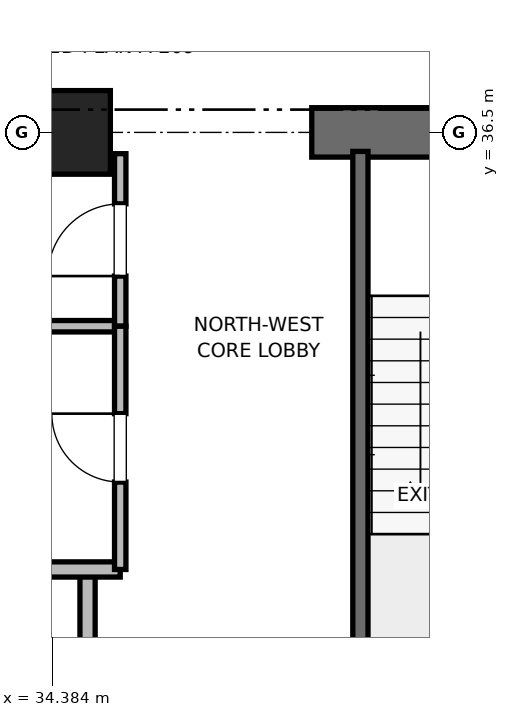
"""IFC4 building model, lengths in metres.
Left out: names, types, materials, properties, quantities, classifications, styles, units other than length and angle.
Written with IfcOpenShell. Run it as: python <this file> out.ifc"""

import sys

from ifc_helpers import new_model, si_unit, direction, frame, frame_2d, origin, origin_2d, place, context, subcontext, project, spatial, rectangle, extrude, element, fill, save


model = new_model("IFC4")
c1 = context("Model", 3, precision=1e-05, world=origin(), true_north=direction((0.0, 1.0)))
c2 = subcontext(c1, "Body", "Model", "MODEL_VIEW")
j1 = project(units=[si_unit("LENGTHUNIT", "METRE"), si_unit("PLANEANGLEUNIT", "RADIAN")], contexts=[c1])
p1 = place(None, origin())
s1 = spatial("IfcSite", under=j1, at=p1, CompositionType="ELEMENT")
p2 = place(p1, origin())
s2 = spatial("IfcBuilding", under=s1, at=p2, CompositionType="ELEMENT")
p3 = place(p2, frame((0.0, 0.0, 31.6)))
s3 = spatial("IfcBuildingStorey", under=s2, at=p3, CompositionType="ELEMENT", Elevation=31.6)
p4 = place(p3, frame((34.6, 36.5, 0.0), z_axis=(0.0, 0.0, 1.0), x_axis=(1.0, 0.0, 0.0)))
e1 = element("IfcColumn", 1, at=p4, inside=s3, PredefinedType="PILASTER", context=c2, shape_type="SweptSolid", body=[
    extrude(rectangle(XDim=1.1, YDim=1.1, at=origin_2d()), origin(), (0.0, 0.0, 1.0), 4.0),
])
p5 = place(p3, frame((29.0, 36.5, 0.0), z_axis=(0.0, 0.0, 1.0), x_axis=(1.0, 0.0, 0.0)))
e2 = element("IfcWall", 2, at=p5, inside=s3, PredefinedType="SHEAR", context=c2, shape_type="SweptSolid", body=[
    extrude(rectangle(XDim=5.8, YDim=0.65, at=frame_2d((2.9, 0.0))), origin(), (0.0, 0.0, 1.0), 3.76),
])
p6 = place(p3, frame((37.8, 36.5, 0.0), z_axis=(0.0, 0.0, 1.0), x_axis=(1.0, 0.0, 0.0)))
e3 = element("IfcWall", 3, at=p6, inside=s3, PredefinedType="SHEAR", context=c2, shape_type="SweptSolid", body=[
    extrude(rectangle(XDim=4.4, YDim=0.65, at=frame_2d((2.2, 0.0))), origin(), (0.0, 0.0, 1.0), 3.76),
])
p7 = place(p6, frame((1.65, 0.0, 0.0)))
e4 = element("IfcOpeningElement", 4, at=p7, cuts=e3, PredefinedType="OPENING", context=c2, shape_type="SweptSolid", body=[
    extrude(rectangle(XDim=1.1, YDim=2.15, at=frame_2d((0.55, 1.075))), frame((0.0, 0.325, 0.0), z_axis=(0.0, -1.0, 0.0), x_axis=(1.0, 0.0, 0.0)), (0.0, 0.0, 1.0), 0.65),
])
p8 = place(p3, frame((38.44, 27.38, 0.0), z_axis=(0.0, 0.0, 1.0), x_axis=(0.0, 1.0, 0.0)))
e5 = element("IfcWall", 5, at=p8, inside=s3, PredefinedType="SOLIDWALL", context=c2, shape_type="SweptSolid", body=[
    extrude(rectangle(XDim=8.87, YDim=0.2, at=frame_2d((4.435, 0.0))), origin(), (0.0, 0.0, 1.0), 3.76),
])
p9 = place(p3, frame((34.85, 27.38, 0.0), z_axis=(0.0, 0.0, 1.0), x_axis=(0.0, 1.0, 0.0)))
e6 = element("IfcWall", 6, at=p9, inside=s3, PredefinedType="PARTITIONING", context=c2, shape_type="SweptSolid", body=[
    extrude(rectangle(XDim=3.37, YDim=0.2, at=frame_2d((1.685, 0.0))), origin(), (0.0, 0.0, 1.0), 3.76),
])
p10 = place(p9, frame((1.11, 0.0, 0.0)))
e7 = element("IfcOpeningElement", 7, at=p10, cuts=e6, PredefinedType="OPENING", context=c2, shape_type="SweptSolid", body=[
    extrude(rectangle(XDim=1.15, YDim=2.2, at=frame_2d((0.575, 1.1))), frame((0.0, 0.1, 0.0), z_axis=(0.0, -1.0, 0.0), x_axis=(1.0, 0.0, 0.0)), (0.0, 0.0, 1.0), 0.2),
])
p11 = place(p3, frame((32.15, 30.75, 0.0), z_axis=(0.0, 0.0, 1.0), x_axis=(1.0, 0.0, 0.0)))
e8 = element("IfcWall", 8, at=p11, inside=s3, PredefinedType="PARTITIONING", context=c2, shape_type="SweptSolid", body=[
    extrude(rectangle(XDim=3.13, YDim=0.2, at=frame_2d((1.565, 0.0))), origin(), (0.0, 0.0, 1.0), 3.76),
])
p12 = place(p3, frame((32.15, 33.95, 0.0), z_axis=(0.0, 0.0, 1.0), x_axis=(1.0, 0.0, 0.0)))
e9 = element("IfcWall", 9, at=p12, inside=s3, PredefinedType="PARTITIONING", context=c2, shape_type="SweptSolid", body=[
    extrude(rectangle(XDim=3.13, YDim=0.15, at=frame_2d((1.565, 0.0))), origin(), (0.0, 0.0, 1.0), 2.85),
])
p13 = place(p3, frame((35.28, 33.95, 0.0), z_axis=(0.0, 0.0, 1.0), x_axis=(0.0, 1.0, 0.0)))
e10 = element("IfcWall", 10, at=p13, inside=s3, PredefinedType="PARTITIONING", context=c2, shape_type="SweptSolid", body=[
    extrude(rectangle(XDim=2.27, YDim=0.15, at=frame_2d((1.135, 0.0))), origin(), (0.0, 0.0, 1.0), 2.54),
])
p14 = place(p13, frame((0.66, 0.0, 0.0)))
e11 = element("IfcOpeningElement", 11, at=p14, cuts=e10, PredefinedType="OPENING", context=c2, shape_type="SweptSolid", body=[
    extrude(rectangle(XDim=0.95, YDim=2.15, at=frame_2d((0.475, 1.075))), frame((0.0, 0.075, 0.0), z_axis=(0.0, -1.0, 0.0), x_axis=(1.0, 0.0, 0.0)), (0.0, 0.0, 1.0), 0.15),
])
p15 = place(p3, frame((35.28, 30.75, 0.0), z_axis=(0.0, 0.0, 1.0), x_axis=(0.0, 1.0, 0.0)))
e12 = element("IfcWall", 12, at=p15, inside=s3, PredefinedType="PARTITIONING", context=c2, shape_type="SweptSolid", body=[
    extrude(rectangle(XDim=3.2, YDim=0.15, at=frame_2d((1.6, 0.0))), origin(), (0.0, 0.0, 1.0), 2.85),
])
p16 = place(p15, frame((1.15, 0.0, 0.0)))
e13 = element("IfcOpeningElement", 13, at=p16, cuts=e12, PredefinedType="OPENING", context=c2, shape_type="SweptSolid", body=[
    extrude(rectangle(XDim=0.9, YDim=2.1, at=frame_2d((0.45, 1.05))), frame((0.0, 0.075, 0.0), z_axis=(0.0, -1.0, 0.0), x_axis=(1.0, 0.0, 0.0)), (0.0, 0.0, 1.0), 0.15),
])
p17 = place(p14, origin())
e14 = element("IfcDoor", 14, at=p17, inside=s3, OperationType="SINGLE_SWING_LEFT", PredefinedType="DOOR", context=c2, shape_type="SweptSolid", body=[
    extrude(rectangle(XDim=0.95, YDim=2.15, at=frame_2d((0.475, 1.075))), frame((0.0, 0.025, 0.0), z_axis=(0.0, -1.0, 0.0), x_axis=(1.0, 0.0, 0.0)), (0.0, 0.0, 1.0), 0.05),
])
fill(e11, e14)
p18 = place(p16, origin())
e15 = element("IfcDoor", 15, at=p18, inside=s3, OperationType="SINGLE_SWING_RIGHT", PredefinedType="DOOR", context=c2, shape_type="SweptSolid", body=[
    extrude(rectangle(XDim=0.9, YDim=2.1, at=frame_2d((0.45, 1.05))), frame((0.0, 0.025, 0.0), z_axis=(0.0, -1.0, 0.0), x_axis=(1.0, 0.0, 0.0)), (0.0, 0.0, 1.0), 0.05),
])
fill(e13, e15)
save(model, sys.argv[1])
